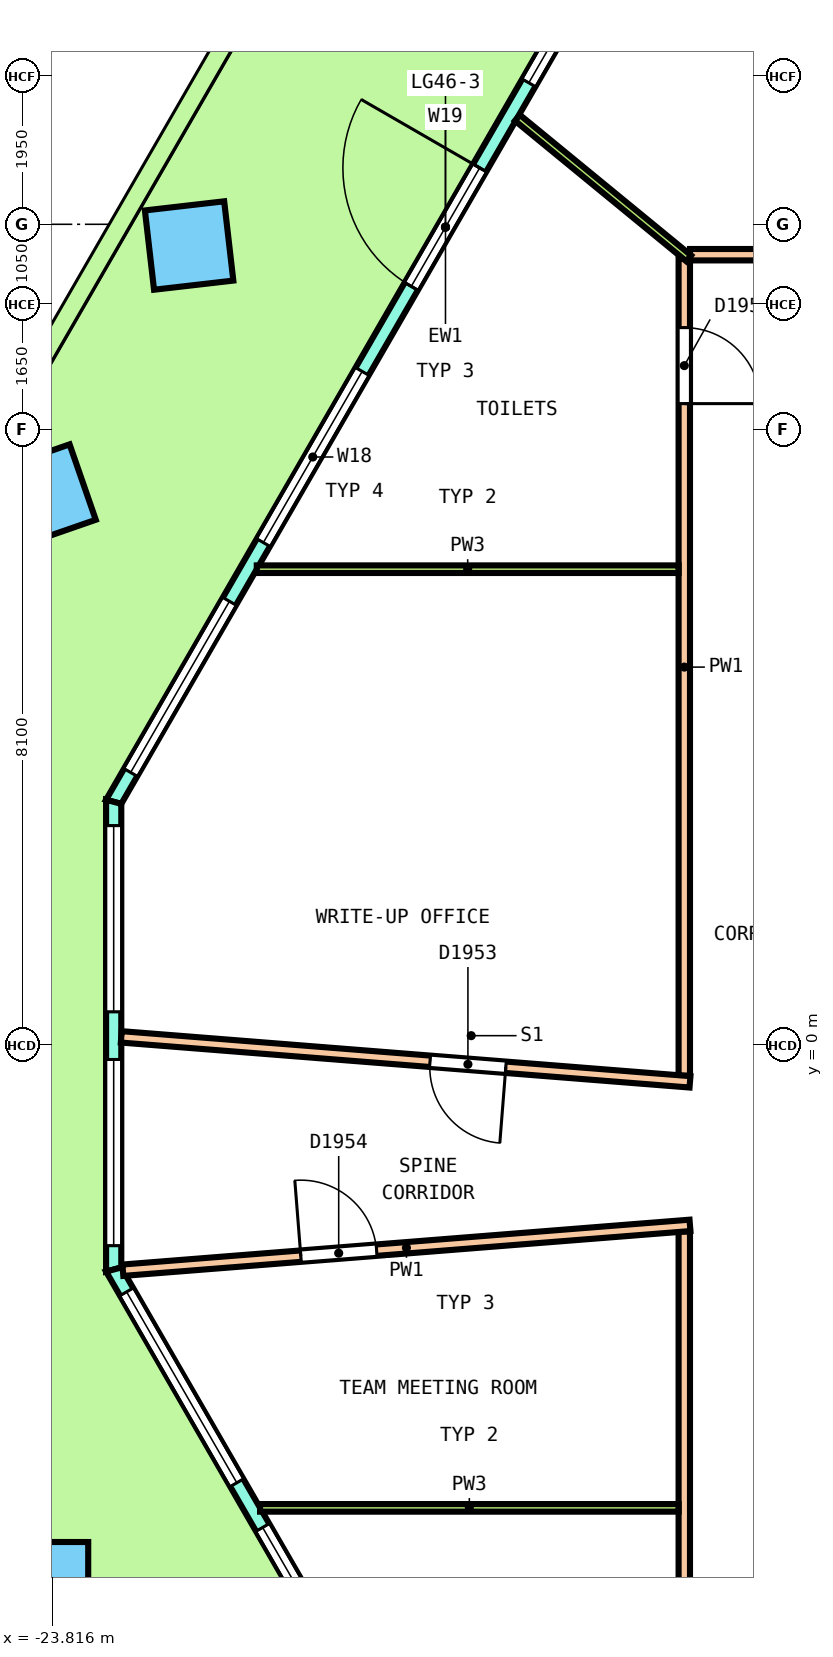
"""IFC4 building model, lengths in metres.
Left out: names, types, materials, properties, quantities, classifications, styles, units other than length and angle.
Written with IfcOpenShell. Run it as: python <this file> out.ifc"""

import sys

from ifc_helpers import new_model, si_unit, direction, frame, frame_2d, origin, origin_2d, place, context, subcontext, project, spatial, polyline, rectangle, outline, extrude, element, fill, save


model = new_model("IFC4")
c1 = context("Model", 3, precision=1e-05, world=origin(), true_north=direction((0.0, 1.0)))
c2 = subcontext(c1, "Body", "Model", "MODEL_VIEW")
j1 = project(units=[si_unit("LENGTHUNIT", "METRE"), si_unit("PLANEANGLEUNIT", "RADIAN")], contexts=[c1])
p1 = place(None, origin())
s1 = spatial("IfcSite", under=j1, at=p1, CompositionType="ELEMENT")
p2 = place(p1, origin())
s2 = spatial("IfcBuilding", under=s1, at=p2, CompositionType="ELEMENT")
p3 = place(p2, frame((0.0, 0.0, 215.4)))
s3 = spatial("IfcBuildingStorey", under=s2, at=p3, CompositionType="ELEMENT", Elevation=215.4)
p4 = place(p3, frame((-22.015, 10.521, 0.0), z_axis=(-0.025403639223, 0.018852174371, 0.999499500068), x_axis=(-0.500083888167, -0.865969385556, 0.003623268626)))
e1 = element("IfcColumn", 1, at=p4, inside=s3, PredefinedType="COLUMN", context=c2, shape_type="SweptSolid", body=[
    extrude(rectangle(XDim=1.05, YDim=1.05, at=origin_2d()), origin(), (0.0, 0.0, 1.0), 3.652),
])
p5 = place(p3, frame((-23.911, 7.237, 0.0), z_axis=(-0.021725676399, 0.025134936388, 0.999447962606), x_axis=(-0.500488924466, -0.86567442941, 0.010891223664)))
e2 = element("IfcColumn", 2, at=p5, inside=s3, PredefinedType="COLUMN", context=c2, shape_type="SweptSolid", body=[
    extrude(rectangle(XDim=1.05, YDim=1.05, at=origin_2d()), origin(), (0.0, 0.0, 1.0), 3.652),
])
p6 = place(p3, frame((-23.867, -7.061, 0.0), z_axis=(-0.010899694483, 0.018857140148, 0.999762774325), x_axis=(0.499728940012, -0.865907957958, 0.021780607409)))
e3 = element("IfcColumn", 3, at=p6, inside=s3, PredefinedType="COLUMN", context=c2, shape_type="SweptSolid", body=[
    extrude(rectangle(XDim=1.05, YDim=1.05, at=origin_2d()), origin(), (0.0, 0.0, 1.0), 3.651),
])
p7 = place(p3, frame((-14.277, 18.323, 0.0), z_axis=(0.0, 0.0, 1.0), x_axis=(-0.500006883229, -0.866021429714, 0.0)))
e4 = element("IfcWall", 4, at=p7, inside=s3, PredefinedType="SOLIDWALL", context=c2, shape_type="SweptSolid", body=[
    extrude(outline(polyline([(-0.027, -0.1), (1.003, -0.1), (2.034, -0.1), (3.064, -0.1), (4.094, -0.1), (5.125, -0.1), (6.155, -0.1), (7.185, -0.1), (8.215, -0.1), (9.245, -0.1), (10.276, -0.1), (11.306, -0.1), (12.336, -0.1), (13.366, -0.1), (14.397, -0.1), (15.427, -0.1), (16.457, -0.1), (17.488, -0.1), (17.434, 0.1), (16.41, 0.1), (15.386, 0.1), (14.362, 0.1), (13.338, 0.1), (12.314, 0.1), (11.29, 0.1), (10.266, 0.1), (9.242, 0.1), (8.218, 0.1), (7.194, 0.1), (6.17, 0.1), (5.146, 0.1), (4.123, 0.1), (3.099, 0.1), (2.075, 0.1), (1.051, 0.1), (0.027, 0.1), (-0.027, -0.1)])), origin(), (0.0, 0.0, 1.0), 3.7),
])
p8 = place(p7, frame((0.446, 0.0, 0.1)))
e5 = element("IfcOpeningElement", 5, at=p8, cuts=e4, PredefinedType="OPENING", context=c2, shape_type="SweptSolid", body=[
    extrude(rectangle(XDim=2.6, YDim=2.65, at=frame_2d((1.3, 1.325))), frame((0.0, 0.11, 0.0), z_axis=(0.0, -1.0, 0.0), x_axis=(1.0, 0.0, 0.0)), (0.0, 0.0, 1.0), 0.22),
])
p9 = place(p7, frame((3.938, 0.0, 0.1)))
e6 = element("IfcOpeningElement", 6, at=p9, cuts=e4, PredefinedType="OPENING", context=c2, shape_type="SweptSolid", body=[
    extrude(rectangle(XDim=2.6, YDim=2.65, at=frame_2d((1.3, 1.325))), frame((0.0, 0.11, 0.0), z_axis=(0.0, -1.0, 0.0), x_axis=(1.0, 0.0, 0.0)), (0.0, 0.0, 1.0), 0.22),
])
p10 = place(p7, frame((7.83, 0.0, 0.0)))
e7 = element("IfcOpeningElement", 7, at=p10, cuts=e4, PredefinedType="OPENING", context=c2, shape_type="SweptSolid", body=[
    extrude(rectangle(XDim=1.8, YDim=2.4, at=frame_2d((0.9, 1.2))), frame((0.0, 0.11, 0.0), z_axis=(0.0, -1.0, 0.0), x_axis=(1.0, 0.0, 0.0)), (0.0, 0.0, 1.0), 0.22),
])
p11 = place(p7, frame((7.83, 0.0, 2.55)))
e8 = element("IfcOpeningElement", 8, at=p11, cuts=e4, PredefinedType="OPENING", context=c2, shape_type="SweptSolid", body=[
    extrude(rectangle(XDim=1.8, YDim=0.2, at=frame_2d((0.9, 0.1))), frame((0.0, 0.11, 0.0), z_axis=(0.0, -1.0, 0.0), x_axis=(1.0, 0.0, 0.0)), (0.0, 0.0, 1.0), 0.22),
])
p12 = place(p7, frame((10.923, 0.0, 0.1)))
e9 = element("IfcOpeningElement", 9, at=p12, cuts=e4, PredefinedType="OPENING", context=c2, shape_type="SweptSolid", body=[
    extrude(rectangle(XDim=2.6, YDim=2.65, at=frame_2d((1.3, 1.325))), frame((0.0, 0.11, 0.0), z_axis=(0.0, -1.0, 0.0), x_axis=(1.0, 0.0, 0.0)), (0.0, 0.0, 1.0), 0.22),
])
p13 = place(p7, frame((14.415, 0.0, 0.1)))
e10 = element("IfcOpeningElement", 10, at=p13, cuts=e4, PredefinedType="OPENING", context=c2, shape_type="SweptSolid", body=[
    extrude(rectangle(XDim=2.6, YDim=2.65, at=frame_2d((1.3, 1.325))), frame((0.0, 0.11, 0.0), z_axis=(0.0, -1.0, 0.0), x_axis=(1.0, 0.0, 0.0)), (0.0, 0.0, 1.0), 0.22),
])
p14 = place(p3, frame((-23.007, 3.202, 0.0), z_axis=(0.0, 0.0, 1.0), x_axis=(0.0, -1.0, 0.0)))
e11 = element("IfcWall", 11, at=p14, inside=s3, PredefinedType="SOLIDWALL", context=c2, shape_type="SweptSolid", body=[
    extrude(outline(polyline([(-0.027, -0.1), (1.008, -0.1), (2.042, -0.1), (3.076, -0.1), (4.111, -0.1), (5.145, -0.1), (6.18, -0.1), (6.126, 0.1), (5.109, 0.1), (4.093, 0.1), (3.076, 0.1), (2.06, 0.1), (1.043, 0.1), (0.027, 0.1), (-0.027, -0.1)])), origin(), (0.0, 0.0, 1.0), 3.7),
])
p15 = place(p14, frame((0.313, 0.0, 0.1)))
e12 = element("IfcOpeningElement", 12, at=p15, cuts=e11, PredefinedType="OPENING", context=c2, shape_type="SweptSolid", body=[
    extrude(rectangle(XDim=2.45, YDim=2.65, at=frame_2d((1.225, 1.325))), frame((0.0, 0.11, 0.0), z_axis=(0.0, -1.0, 0.0), x_axis=(1.0, 0.0, 0.0)), (0.0, 0.0, 1.0), 0.22),
])
p16 = place(p14, frame((3.39, 0.0, 0.1)))
e13 = element("IfcOpeningElement", 13, at=p16, cuts=e11, PredefinedType="OPENING", context=c2, shape_type="SweptSolid", body=[
    extrude(rectangle(XDim=2.45, YDim=2.65, at=frame_2d((1.225, 1.325))), frame((0.0, 0.11, 0.0), z_axis=(0.0, -1.0, 0.0), x_axis=(1.0, 0.0, 0.0)), (0.0, 0.0, 1.0), 0.22),
])
p17 = place(p3, frame((-23.007, -2.951, 0.0), z_axis=(0.0, 0.0, 1.0), x_axis=(0.500006652623, -0.866021562857, 0.0)))
e14 = element("IfcWall", 14, at=p17, inside=s3, PredefinedType="SOLIDWALL", context=c2, shape_type="SweptSolid", body=[
    extrude(outline(polyline([(-0.027, -0.1), (1.029, -0.1), (2.085, -0.1), (3.141, -0.1), (4.197, -0.1), (5.252, -0.1), (6.308, -0.1), (7.364, -0.1), (8.42, -0.1), (9.476, -0.1), (10.532, -0.1), (11.588, -0.1), (12.644, -0.1), (13.699, -0.1), (14.755, -0.1), (15.811, -0.1), (16.867, -0.1), (17.923, -0.1), (17.869, 0.1), (16.82, 0.1), (15.77, 0.1), (14.721, 0.1), (13.671, 0.1), (12.622, 0.1), (11.572, 0.1), (10.522, 0.1), (9.473, 0.1), (8.423, 0.1), (7.374, 0.1), (6.324, 0.1), (5.275, 0.1), (4.225, 0.1), (3.176, 0.1), (2.126, 0.1), (1.076, 0.1), (0.027, 0.1), (-0.027, -0.1)])), origin(), (0.0, 0.0, 1.0), 3.7),
])
p18 = place(p17, frame((0.34, 0.0, 0.1)))
e15 = element("IfcOpeningElement", 15, at=p18, cuts=e14, PredefinedType="OPENING", context=c2, shape_type="SweptSolid", body=[
    extrude(rectangle(XDim=2.9, YDim=2.65, at=frame_2d((1.45, 1.325))), frame((0.0, 0.11, 0.0), z_axis=(0.0, -1.0, 0.0), x_axis=(1.0, 0.0, 0.0)), (0.0, 0.0, 1.0), 0.22),
])
p19 = place(p17, frame((3.919, 0.0, 0.1)))
e16 = element("IfcOpeningElement", 16, at=p19, cuts=e14, PredefinedType="OPENING", context=c2, shape_type="SweptSolid", body=[
    extrude(rectangle(XDim=2.9, YDim=2.65, at=frame_2d((1.45, 1.325))), frame((0.0, 0.11, 0.0), z_axis=(0.0, -1.0, 0.0), x_axis=(1.0, 0.0, 0.0)), (0.0, 0.0, 1.0), 0.22),
])
p20 = place(p17, frame((8.048, 0.0, 0.0)))
e17 = element("IfcOpeningElement", 17, at=p20, cuts=e14, PredefinedType="OPENING", context=c2, shape_type="SweptSolid", body=[
    extrude(rectangle(XDim=1.8, YDim=2.4, at=frame_2d((0.9, 1.2))), frame((0.0, 0.11, 0.0), z_axis=(0.0, -1.0, 0.0), x_axis=(1.0, 0.0, 0.0)), (0.0, 0.0, 1.0), 0.22),
])
p21 = place(p17, frame((8.048, 0.0, 2.55)))
e18 = element("IfcOpeningElement", 18, at=p21, cuts=e14, PredefinedType="OPENING", context=c2, shape_type="SweptSolid", body=[
    extrude(rectangle(XDim=1.8, YDim=0.2, at=frame_2d((0.9, 0.1))), frame((0.0, 0.11, 0.0), z_axis=(0.0, -1.0, 0.0), x_axis=(1.0, 0.0, 0.0)), (0.0, 0.0, 1.0), 0.22),
])
p22 = place(p17, frame((11.077, 0.0, 0.1)))
e19 = element("IfcOpeningElement", 19, at=p22, cuts=e14, PredefinedType="OPENING", context=c2, shape_type="SweptSolid", body=[
    extrude(rectangle(XDim=2.9, YDim=2.65, at=frame_2d((1.45, 1.325))), frame((0.0, 0.11, 0.0), z_axis=(0.0, -1.0, 0.0), x_axis=(1.0, 0.0, 0.0)), (0.0, 0.0, 1.0), 0.22),
])
p23 = place(p17, frame((14.656, 0.0, 0.1)))
e20 = element("IfcOpeningElement", 20, at=p23, cuts=e14, PredefinedType="OPENING", context=c2, shape_type="SweptSolid", body=[
    extrude(rectangle(XDim=2.9, YDim=2.65, at=frame_2d((1.45, 1.325))), frame((0.0, 0.11, 0.0), z_axis=(0.0, -1.0, 0.0), x_axis=(1.0, 0.0, 0.0)), (0.0, 0.0, 1.0), 0.22),
])
p24 = place(p3, frame((-15.425, 10.4, 0.0), z_axis=(0.0, 0.0, 1.0), x_axis=(1.0, 0.0, 0.0)))
e21 = element("IfcWall", 21, at=p24, inside=s3, PredefinedType="PARTITIONING", context=c2, shape_type="SweptSolid", body=[
    extrude(rectangle(XDim=30.875, YDim=0.15, at=frame_2d((15.438, 0.0))), origin(), (0.0, 0.0, 1.0), 2.8),
])
p25 = place(p24, frame((20.234, 0.0, 0.0)))
e22 = element("IfcOpeningElement", 22, at=p25, cuts=e21, PredefinedType="OPENING", context=c2, shape_type="SweptSolid", body=[
    extrude(rectangle(XDim=1.2, YDim=2.1, at=frame_2d((0.6, 1.05))), frame((0.0, 0.085, 0.0), z_axis=(0.0, -1.0, 0.0), x_axis=(1.0, 0.0, 0.0)), (0.0, 0.0, 1.0), 0.17),
])
p26 = place(p24, frame((11.235, 0.0, 0.0)))
e23 = element("IfcOpeningElement", 23, at=p26, cuts=e21, PredefinedType="OPENING", context=c2, shape_type="SweptSolid", body=[
    extrude(rectangle(XDim=1.2, YDim=2.1, at=frame_2d((0.6, 1.05))), frame((0.0, 0.085, 0.0), z_axis=(0.0, -1.0, 0.0), x_axis=(1.0, 0.0, 0.0)), (0.0, 0.0, 1.0), 0.17),
])
p27 = place(p24, frame((3.281, 0.0, 0.0)))
e24 = element("IfcOpeningElement", 24, at=p27, cuts=e21, PredefinedType="OPENING", context=c2, shape_type="SweptSolid", body=[
    extrude(rectangle(XDim=1.2, YDim=2.1, at=frame_2d((0.6, 1.05))), frame((0.0, 0.085, 0.0), z_axis=(0.0, -1.0, 0.0), x_axis=(1.0, 0.0, 0.0)), (0.0, 0.0, 1.0), 0.17),
])
p28 = place(p3, frame((-15.5, -10.325, 0.0), z_axis=(0.0, 0.0, 1.0), x_axis=(0.0, 1.0, 0.0)))
e25 = element("IfcWall", 25, at=p28, inside=s3, PredefinedType="PARTITIONING", context=c2, shape_type="SweptSolid", body=[
    extrude(rectangle(XDim=7.874, YDim=0.15, at=frame_2d((3.937, 0.0))), origin(), (0.0, 0.0, 1.0), 2.8),
])
p29 = place(p28, frame((0.928, 0.0, 0.0)))
e26 = element("IfcOpeningElement", 26, at=p29, cuts=e25, PredefinedType="OPENING", context=c2, shape_type="SweptSolid", body=[
    extrude(rectangle(XDim=1.0, YDim=2.1, at=frame_2d((0.5, 1.05))), frame((0.0, 0.085, 0.0), z_axis=(0.0, -1.0, 0.0), x_axis=(1.0, 0.0, 0.0)), (0.0, 0.0, 1.0), 0.17),
])
p30 = place(p3, frame((-15.5, -0.401, 0.0), z_axis=(0.0, 0.0, 1.0), x_axis=(0.0, 1.0, 0.0)))
e27 = element("IfcWall", 27, at=p30, inside=s3, PredefinedType="PARTITIONING", context=c2, shape_type="SweptSolid", body=[
    extrude(rectangle(XDim=10.751, YDim=0.15, at=frame_2d((5.375, 0.0))), origin(), (0.0, 0.0, 1.0), 2.8),
])
p31 = place(p30, frame((8.842, 0.0, 0.0)))
e28 = element("IfcOpeningElement", 28, at=p31, cuts=e27, PredefinedType="OPENING", context=c2, shape_type="SweptSolid", body=[
    extrude(rectangle(XDim=1.0, YDim=2.1, at=frame_2d((0.5, 1.05))), frame((0.0, 0.085, 0.0), z_axis=(0.0, -1.0, 0.0), x_axis=(1.0, 0.0, 0.0)), (0.0, 0.0, 1.0), 0.17),
])
p32 = place(p3, frame((-22.907, 0.11, 0.0), z_axis=(0.0, 0.0, 1.0), x_axis=(0.996888805711, -0.078820739965, 0.0)))
e29 = element("IfcWall", 29, at=p32, inside=s3, PredefinedType="PARTITIONING", context=c2, shape_type="SweptSolid", body=[
    extrude(rectangle(XDim=7.505, YDim=0.15, at=frame_2d((3.752, 0.0))), origin(), (0.0, 0.0, 1.0), 2.8),
])
p33 = place(p32, frame((4.075, 0.0, 0.0)))
e30 = element("IfcOpeningElement", 30, at=p33, cuts=e29, PredefinedType="OPENING", context=c2, shape_type="SweptSolid", body=[
    extrude(rectangle(XDim=1.0, YDim=2.1, at=frame_2d((0.5, 1.05))), frame((0.0, 0.085, 0.0), z_axis=(0.0, -1.0, 0.0), x_axis=(1.0, 0.0, 0.0)), (0.0, 0.0, 1.0), 0.17),
])
p34 = place(p3, frame((-22.886, -2.96, 0.0), z_axis=(0.0, 0.0, 1.0), x_axis=(0.996886755429, 0.078846666706, 0.0)))
e31 = element("IfcWall", 31, at=p34, inside=s3, PredefinedType="PARTITIONING", context=c2, shape_type="SweptSolid", body=[
    extrude(rectangle(XDim=7.484, YDim=0.15, at=frame_2d((3.742, 0.0))), origin(), (0.0, 0.0, 1.0), 2.8),
])
p35 = place(p34, frame((2.348, 0.0, 0.0)))
e32 = element("IfcOpeningElement", 32, at=p35, cuts=e31, PredefinedType="OPENING", context=c2, shape_type="SweptSolid", body=[
    extrude(rectangle(XDim=1.0, YDim=2.1, at=frame_2d((0.5, 1.05))), frame((0.0, 0.085, 0.0), z_axis=(0.0, -1.0, 0.0), x_axis=(1.0, 0.0, 0.0)), (0.0, 0.0, 1.0), 0.17),
])
p36 = place(p3, frame((-17.696, 12.201, 0.0), z_axis=(0.0, 0.0, 1.0), x_axis=(0.773188128528, -0.634176724504, 0.0)))
e33 = element("IfcWall", 33, at=p36, inside=s3, PredefinedType="PARTITIONING", context=c2, shape_type="SweptSolid", body=[
    extrude(rectangle(XDim=2.915, YDim=0.1, at=frame_2d((1.458, 0.0))), origin(), (0.0, 0.0, 1.0), 2.8),
])
p37 = place(p3, frame((-21.125, 6.262, 0.0), z_axis=(0.0, 0.0, 1.0), x_axis=(1.0, 0.0, 0.0)))
e34 = element("IfcWall", 34, at=p37, inside=s3, PredefinedType="PARTITIONING", context=c2, shape_type="SweptSolid", body=[
    extrude(rectangle(XDim=5.55, YDim=0.1, at=frame_2d((2.775, 0.0))), origin(), (0.0, 0.0, 1.0), 2.8),
])
p38 = place(p3, frame((-21.081, -6.086, 0.0), z_axis=(0.0, 0.0, 1.0), x_axis=(1.0, 0.0, 0.0)))
e35 = element("IfcWall", 35, at=p38, inside=s3, PredefinedType="PARTITIONING", context=c2, shape_type="SweptSolid", body=[
    extrude(rectangle(XDim=5.506, YDim=0.1, at=frame_2d((2.753, 0.0))), origin(), (0.0, 0.0, 1.0), 2.8),
])
p39 = place(p9, origin())
e36 = element("IfcWindow", 36, at=p39, inside=s3, PartitioningType="SINGLE_PANEL", PredefinedType="WINDOW", context=c2, shape_type="SweptSolid", body=[
    extrude(rectangle(XDim=2.6, YDim=2.65, at=frame_2d((1.3, 1.325))), frame((0.0, 0.03, 0.0), z_axis=(0.0, -1.0, 0.0), x_axis=(1.0, 0.0, 0.0)), (0.0, 0.0, 1.0), 0.06),
])
fill(e6, e36)
p40 = place(p10, origin())
e37 = element("IfcDoor", 37, at=p40, inside=s3, OperationType="DOUBLE_DOOR_SINGLE_SWING", PredefinedType="DOOR", context=c2, shape_type="SweptSolid", body=[
    extrude(rectangle(XDim=1.8, YDim=2.4, at=frame_2d((0.9, 1.2))), frame((0.0, 0.025, 0.0), z_axis=(0.0, -1.0, 0.0), x_axis=(1.0, 0.0, 0.0)), (0.0, 0.0, 1.0), 0.05),
])
fill(e7, e37)
p41 = place(p11, origin())
e38 = element("IfcWindow", 38, at=p41, inside=s3, PartitioningType="SINGLE_PANEL", PredefinedType="WINDOW", context=c2, shape_type="SweptSolid", body=[
    extrude(rectangle(XDim=1.8, YDim=0.2, at=frame_2d((0.9, 0.1))), frame((0.0, 0.03, 0.0), z_axis=(0.0, -1.0, 0.0), x_axis=(1.0, 0.0, 0.0)), (0.0, 0.0, 1.0), 0.06),
])
fill(e8, e38)
p42 = place(p12, origin())
e39 = element("IfcWindow", 39, at=p42, inside=s3, PartitioningType="SINGLE_PANEL", PredefinedType="WINDOW", context=c2, shape_type="SweptSolid", body=[
    extrude(rectangle(XDim=2.6, YDim=2.65, at=frame_2d((1.3, 1.325))), frame((0.0, 0.03, 0.0), z_axis=(0.0, -1.0, 0.0), x_axis=(1.0, 0.0, 0.0)), (0.0, 0.0, 1.0), 0.06),
])
fill(e9, e39)
p43 = place(p13, origin())
e40 = element("IfcWindow", 40, at=p43, inside=s3, PartitioningType="SINGLE_PANEL", PredefinedType="WINDOW", context=c2, shape_type="SweptSolid", body=[
    extrude(rectangle(XDim=2.6, YDim=2.65, at=frame_2d((1.3, 1.325))), frame((0.0, 0.03, 0.0), z_axis=(0.0, -1.0, 0.0), x_axis=(1.0, 0.0, 0.0)), (0.0, 0.0, 1.0), 0.06),
])
fill(e10, e40)
p44 = place(p15, origin())
e41 = element("IfcWindow", 41, at=p44, inside=s3, PartitioningType="SINGLE_PANEL", PredefinedType="WINDOW", context=c2, shape_type="SweptSolid", body=[
    extrude(rectangle(XDim=2.45, YDim=2.65, at=frame_2d((1.225, 1.325))), frame((0.0, 0.03, 0.0), z_axis=(0.0, -1.0, 0.0), x_axis=(1.0, 0.0, 0.0)), (0.0, 0.0, 1.0), 0.06),
])
fill(e12, e41)
p45 = place(p16, origin())
e42 = element("IfcWindow", 42, at=p45, inside=s3, PartitioningType="SINGLE_PANEL", PredefinedType="WINDOW", context=c2, shape_type="SweptSolid", body=[
    extrude(rectangle(XDim=2.45, YDim=2.65, at=frame_2d((1.225, 1.325))), frame((0.0, 0.03, 0.0), z_axis=(0.0, -1.0, 0.0), x_axis=(1.0, 0.0, 0.0)), (0.0, 0.0, 1.0), 0.06),
])
fill(e13, e42)
p46 = place(p18, origin())
e43 = element("IfcWindow", 43, at=p46, inside=s3, PartitioningType="SINGLE_PANEL", PredefinedType="WINDOW", context=c2, shape_type="SweptSolid", body=[
    extrude(rectangle(XDim=2.9, YDim=2.65, at=frame_2d((1.45, 1.325))), frame((0.0, 0.03, 0.0), z_axis=(0.0, -1.0, 0.0), x_axis=(1.0, 0.0, 0.0)), (0.0, 0.0, 1.0), 0.06),
])
fill(e15, e43)
p47 = place(p19, origin())
e44 = element("IfcWindow", 44, at=p47, inside=s3, PartitioningType="SINGLE_PANEL", PredefinedType="WINDOW", context=c2, shape_type="SweptSolid", body=[
    extrude(rectangle(XDim=2.9, YDim=2.65, at=frame_2d((1.45, 1.325))), frame((0.0, 0.03, 0.0), z_axis=(0.0, -1.0, 0.0), x_axis=(1.0, 0.0, 0.0)), (0.0, 0.0, 1.0), 0.06),
])
fill(e16, e44)
p48 = place(p31, origin())
e45 = element("IfcDoor", 45, at=p48, inside=s3, OperationType="SINGLE_SWING_RIGHT", PredefinedType="DOOR", context=c2, shape_type="SweptSolid", body=[
    extrude(rectangle(XDim=1.0, YDim=2.1, at=frame_2d((0.5, 1.05))), frame((0.0, 0.025, 0.0), z_axis=(0.0, -1.0, 0.0), x_axis=(1.0, 0.0, 0.0)), (0.0, 0.0, 1.0), 0.05),
])
fill(e28, e45)
p49 = place(p33, origin())
e46 = element("IfcDoor", 46, at=p49, inside=s3, OperationType="SINGLE_SWING_RIGHT", PredefinedType="DOOR", context=c2, shape_type="SweptSolid", body=[
    extrude(rectangle(XDim=1.0, YDim=2.1, at=frame_2d((0.5, 1.05))), frame((0.0, 0.025, 0.0), z_axis=(0.0, -1.0, 0.0), x_axis=(1.0, 0.0, 0.0)), (0.0, 0.0, 1.0), 0.05),
])
fill(e30, e46)
p50 = place(p35, origin())
e47 = element("IfcDoor", 47, at=p50, inside=s3, OperationType="SINGLE_SWING_RIGHT", PredefinedType="DOOR", context=c2, shape_type="SweptSolid", body=[
    extrude(rectangle(XDim=1.0, YDim=2.1, at=frame_2d((0.5, 1.05))), frame((0.0, 0.025, 0.0), z_axis=(0.0, -1.0, 0.0), x_axis=(1.0, 0.0, 0.0)), (0.0, 0.0, 1.0), 0.05),
])
fill(e32, e47)
save(model, sys.argv[1])
